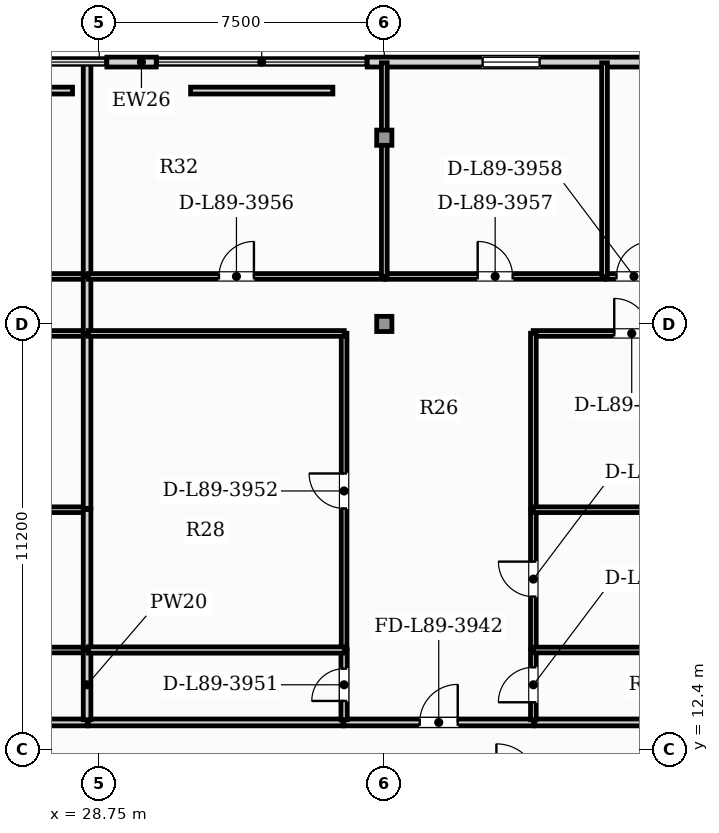
"""IFC4 building model, lengths in metres.
Left out: names, types, materials, properties, quantities, classifications, styles, units other than length and angle.
Written with IfcOpenShell. Run it as: python <this file> out.ifc"""

import sys

from ifc_helpers import new_model, si_unit, direction, frame, frame_2d, origin, origin_2d, place, context, subcontext, project, spatial, rectangle, hollow_rectangle, extrude, element, fill, save


model = new_model("IFC4")
c1 = context("Model", 3, precision=1e-05, world=origin(), true_north=direction((0.0, 1.0)))
c2 = subcontext(c1, "Body", "Model", "MODEL_VIEW")
j1 = project(units=[si_unit("LENGTHUNIT", "METRE"), si_unit("PLANEANGLEUNIT", "RADIAN")], contexts=[c1])
p1 = place(None, origin())
s1 = spatial("IfcSite", under=j1, at=p1, CompositionType="ELEMENT")
p2 = place(p1, origin())
s2 = spatial("IfcBuilding", under=s1, at=p2, CompositionType="ELEMENT")
p3 = place(p2, frame((0.0, 0.0, 362.25)))
s3 = spatial("IfcBuildingStorey", under=s2, at=p3, CompositionType="ELEMENT", Elevation=362.25)
for number, where, z_axis, x_axis in (
    (1, (36.25, 23.6, 0.0), (0.0, 0.0, 1.0), (1.0, 0.0, 0.0)),
    (2, (36.25, 28.5, 0.0), (0.0, 0.0, 1.0), (1.0, 0.0, 0.0)),
):
    element("IfcColumn", number, at=place(p3, frame(where, z_axis=z_axis, x_axis=x_axis)), inside=s3, PredefinedType="COLUMN", context=c2, shape_type="SweptSolid", body=[
        extrude(hollow_rectangle(XDim=0.4, YDim=0.4, WallThickness=0.02, at=origin_2d()), origin(), (0.0, 0.0, 1.0), 4.35),
    ])
p4 = place(p3, frame((30.25, 30.49, 0.0), z_axis=(0.0, 0.0, 1.0), x_axis=(-1.0, 0.0, 0.0)))
e3 = element("IfcWall", 3, at=p4, inside=s3, PredefinedType="SOLIDWALL", context=c2, shape_type="SweptSolid", body=[
    extrude(rectangle(XDim=1.3, YDim=0.26, at=frame_2d((0.65, 0.0))), origin(), (0.0, 0.0, 1.0), 4.1),
])
p5 = place(p3, frame((44.485, 30.49, 0.0), z_axis=(0.0, 0.0, 1.0), x_axis=(-1.0, 0.0, 0.0)))
e4 = element("IfcWall", 4, at=p5, inside=s3, PredefinedType="SOLIDWALL", context=c2, shape_type="SweptSolid", body=[
    extrude(rectangle(XDim=8.685, YDim=0.26, at=frame_2d((4.343, 0.0))), origin(), (0.0, 0.0, 1.0), 4.1),
])
p6 = place(p5, frame((4.148, 0.0, 0.9)))
e5 = element("IfcOpeningElement", 5, at=p6, cuts=e4, PredefinedType="OPENING", context=c2, shape_type="SweptSolid", body=[
    extrude(rectangle(XDim=1.5, YDim=1.95, at=frame_2d((0.75, 0.975))), frame((0.0, 0.14, 0.0), z_axis=(0.0, -1.0, 0.0), x_axis=(1.0, 0.0, 0.0)), (0.0, 0.0, 1.0), 0.28),
])
p7 = place(p3, frame((22.096, 13.115, 0.0), z_axis=(0.0, 0.0, 1.0), x_axis=(1.0, 0.0, 0.0)))
e6 = element("IfcWall", 6, at=p7, inside=s3, PredefinedType="PARTITIONING", context=c2, shape_type="SweptSolid", body=[
    extrude(rectangle(XDim=6.339, YDim=0.18, at=frame_2d((3.169, 0.0))), origin(), (0.0, 0.0, 1.0), 4.1),
])
p8 = place(p3, frame((35.187, 13.115, 0.0), z_axis=(0.0, 0.0, 1.0), x_axis=(1.0, 0.0, 0.0)))
e7 = element("IfcWall", 7, at=p8, inside=s3, PredefinedType="PARTITIONING", context=c2, shape_type="SweptSolid", body=[
    extrude(rectangle(XDim=4.99, YDim=0.18, at=frame_2d((2.495, 0.0))), origin(), (0.0, 0.0, 1.0), 4.1),
])
p9 = place(p8, frame((1.995, 0.0, 0.0)))
e8 = element("IfcOpeningElement", 8, at=p9, cuts=e7, PredefinedType="OPENING", context=c2, shape_type="SweptSolid", body=[
    extrude(rectangle(XDim=1.0, YDim=2.15, at=frame_2d((0.5, 1.075))), frame((0.0, 0.1, 0.0), z_axis=(0.0, -1.0, 0.0), x_axis=(1.0, 0.0, 0.0)), (0.0, 0.0, 1.0), 0.2),
])
p10 = place(p3, frame((28.464, 13.115, 0.0), z_axis=(0.0, 0.0, 1.0), x_axis=(1.0, 0.0, 0.0)))
e9 = element("IfcWall", 9, at=p10, inside=s3, PredefinedType="PARTITIONING", context=c2, shape_type="SweptSolid", body=[
    extrude(rectangle(XDim=6.693, YDim=0.18, at=frame_2d((3.346, 0.0))), origin(), (0.0, 0.0, 1.0), 4.1),
])
p11 = place(p3, frame((40.207, 13.115, 0.0), z_axis=(0.0, 0.0, 1.0), x_axis=(1.0, 0.0, 0.0)))
e10 = element("IfcWall", 10, at=p11, inside=s3, PredefinedType="PARTITIONING", context=c2, shape_type="SweptSolid", body=[
    extrude(rectangle(XDim=7.368, YDim=0.18, at=frame_2d((3.684, 0.0))), origin(), (0.0, 0.0, 1.0), 4.1),
])
p12 = place(p3, frame((22.056, 23.35, 0.0), z_axis=(0.0, 0.0, 1.0), x_axis=(1.0, 0.0, 0.0)))
e11 = element("IfcWall", 11, at=p12, inside=s3, PredefinedType="PARTITIONING", context=c2, shape_type="SweptSolid", body=[
    extrude(rectangle(XDim=6.379, YDim=0.15, at=frame_2d((3.189, 0.0))), origin(), (0.0, 0.0, 1.0), 3.2),
])
p13 = place(p12, frame((2.729, 0.0, 0.0)))
e12 = element("IfcOpeningElement", 12, at=p13, cuts=e11, PredefinedType="OPENING", context=c2, shape_type="SweptSolid", body=[
    extrude(rectangle(XDim=0.92, YDim=2.1, at=frame_2d((0.46, 1.05))), frame((0.0, 0.085, 0.0), z_axis=(0.0, -1.0, 0.0), x_axis=(1.0, 0.0, 0.0)), (0.0, 0.0, 1.0), 0.17),
])
p14 = place(p3, frame((23.231, 24.85, 0.0), z_axis=(0.0, 0.0, 1.0), x_axis=(1.0, 0.0, 0.0)))
e13 = element("IfcWall", 13, at=p14, inside=s3, PredefinedType="PARTITIONING", context=c2, shape_type="SweptSolid", body=[
    extrude(rectangle(XDim=5.203, YDim=0.15, at=frame_2d((2.602, 0.0))), origin(), (0.0, 0.0, 1.0), 4.1),
])
p15 = place(p14, frame((2.142, 0.0, 0.0)))
e14 = element("IfcOpeningElement", 14, at=p15, cuts=e13, PredefinedType="OPENING", context=c2, shape_type="SweptSolid", body=[
    extrude(rectangle(XDim=0.92, YDim=2.1, at=frame_2d((0.46, 1.05))), frame((0.0, 0.085, 0.0), z_axis=(0.0, -1.0, 0.0), x_axis=(1.0, 0.0, 0.0)), (0.0, 0.0, 1.0), 0.17),
])
p16 = place(p3, frame((28.429, 23.345, 0.0), z_axis=(0.0, 0.0, 1.0), x_axis=(0.0, 1.0, 0.0)))
e15 = element("IfcWall", 15, at=p16, inside=s3, PredefinedType="PARTITIONING", context=c2, shape_type="SweptSolid", body=[
    extrude(rectangle(XDim=1.51, YDim=0.2, at=frame_2d((0.755, 0.0))), origin(), (0.0, 0.0, 1.0), 4.1),
])
p17 = place(p3, frame((22.056, 15.02, 0.0), z_axis=(0.0, 0.0, 1.0), x_axis=(1.0, 0.0, 0.0)))
e16 = element("IfcWall", 16, at=p17, inside=s3, PredefinedType="PARTITIONING", context=c2, shape_type="SweptSolid", body=[
    extrude(rectangle(XDim=6.379, YDim=0.15, at=frame_2d((3.189, 0.0))), origin(), (0.0, 0.0, 1.0), 4.1),
])
p18 = place(p3, frame((28.429, 13.185, 0.0), z_axis=(0.0, 0.0, 1.0), x_axis=(0.0, 1.0, 0.0)))
e17 = element("IfcWall", 17, at=p18, inside=s3, PredefinedType="PARTITIONING", context=c2, shape_type="SweptSolid", body=[
    extrude(rectangle(XDim=1.84, YDim=0.2, at=frame_2d((0.92, 0.0))), origin(), (0.0, 0.0, 1.0), 4.1),
])
p19 = place(p3, frame((22.056, 18.712, 0.0), z_axis=(0.0, 0.0, 1.0), x_axis=(1.0, 0.0, 0.0)))
e18 = element("IfcWall", 18, at=p19, inside=s3, PredefinedType="PARTITIONING", context=c2, shape_type="SweptSolid", body=[
    extrude(rectangle(XDim=6.379, YDim=0.15, at=frame_2d((3.189, 0.0))), origin(), (0.0, 0.0, 1.0), 4.1),
])
p20 = place(p3, frame((28.429, 15.055, 0.0), z_axis=(0.0, 0.0, 1.0), x_axis=(0.0, 1.0, 0.0)))
e19 = element("IfcWall", 19, at=p20, inside=s3, PredefinedType="PARTITIONING", context=c2, shape_type="SweptSolid", body=[
    extrude(rectangle(XDim=3.662, YDim=0.2, at=frame_2d((1.831, 0.0))), origin(), (0.0, 0.0, 1.0), 4.1),
])
p21 = place(p3, frame((28.429, 18.747, 0.0), z_axis=(0.0, 0.0, 1.0), x_axis=(0.0, 1.0, 0.0)))
e20 = element("IfcWall", 20, at=p21, inside=s3, PredefinedType="PARTITIONING", context=c2, shape_type="SweptSolid", body=[
    extrude(rectangle(XDim=4.568, YDim=0.2, at=frame_2d((2.284, 0.0))), origin(), (0.0, 0.0, 1.0), 4.1),
])
p22 = place(p3, frame((28.429, 24.885, 0.0), z_axis=(0.0, 0.0, 1.0), x_axis=(0.0, 1.0, 0.0)))
e21 = element("IfcWall", 21, at=p22, inside=s3, PredefinedType="PARTITIONING", context=c2, shape_type="SweptSolid", body=[
    extrude(rectangle(XDim=5.587, YDim=0.2, at=frame_2d((2.793, 0.0))), origin(), (0.0, 0.0, 1.0), 4.1),
])
p23 = place(p3, frame((35.192, 13.185, 0.0), z_axis=(0.0, 0.0, 1.0), x_axis=(0.0, 1.0, 0.0)))
e22 = element("IfcWall", 22, at=p23, inside=s3, PredefinedType="PLUMBINGWALL", context=c2, shape_type="SweptSolid", body=[
    extrude(rectangle(XDim=1.84, YDim=0.165, at=frame_2d((0.92, 0.0))), origin(), (0.0, 0.0, 1.0), 4.1),
])
p24 = place(p23, frame((0.495, 0.0, 0.0)))
e23 = element("IfcOpeningElement", 23, at=p24, cuts=e22, PredefinedType="OPENING", context=c2, shape_type="SweptSolid", body=[
    extrude(rectangle(XDim=0.85, YDim=2.1, at=frame_2d((0.425, 1.05))), frame((0.0, 0.093, 0.0), z_axis=(0.0, -1.0, 0.0), x_axis=(1.0, 0.0, 0.0)), (0.0, 0.0, 1.0), 0.185),
])
p25 = place(p3, frame((35.192, 15.055, 0.0), z_axis=(0.0, 0.0, 1.0), x_axis=(0.0, 1.0, 0.0)))
e24 = element("IfcWall", 24, at=p25, inside=s3, PredefinedType="PARTITIONING", context=c2, shape_type="SweptSolid", body=[
    extrude(rectangle(XDim=8.3, YDim=0.15, at=frame_2d((4.15, 0.0))), origin(), (0.0, 0.0, 1.0), 4.1),
])
p26 = place(p25, frame((3.69, 0.0, 0.0)))
e25 = element("IfcOpeningElement", 25, at=p26, cuts=e24, PredefinedType="OPENING", context=c2, shape_type="SweptSolid", body=[
    extrude(rectangle(XDim=0.92, YDim=2.1, at=frame_2d((0.46, 1.05))), frame((0.0, 0.085, 0.0), z_axis=(0.0, -1.0, 0.0), x_axis=(1.0, 0.0, 0.0)), (0.0, 0.0, 1.0), 0.17),
])
p27 = place(p3, frame((28.464, 23.35, 0.0), z_axis=(0.0, 0.0, 1.0), x_axis=(1.0, 0.0, 0.0)))
e26 = element("IfcWall", 26, at=p27, inside=s3, PredefinedType="PARTITIONING", context=c2, shape_type="SweptSolid", body=[
    extrude(rectangle(XDim=6.733, YDim=0.15, at=frame_2d((3.366, 0.0))), origin(), (0.0, 0.0, 1.0), 3.2),
])
p28 = place(p3, frame((40.172, 13.185, 0.0), z_axis=(0.0, 0.0, 1.0), x_axis=(0.0, 1.0, 0.0)))
e27 = element("IfcWall", 27, at=p28, inside=s3, PredefinedType="PARTITIONING", context=c2, shape_type="SweptSolid", body=[
    extrude(rectangle(XDim=1.84, YDim=0.15, at=frame_2d((0.92, 0.0))), origin(), (0.0, 0.0, 1.0), 3.797),
])
p29 = place(p28, frame((0.46, 0.0, 0.0)))
e28 = element("IfcOpeningElement", 28, at=p29, cuts=e27, PredefinedType="OPENING", context=c2, shape_type="SweptSolid", body=[
    extrude(rectangle(XDim=0.92, YDim=2.1, at=frame_2d((0.46, 1.05))), frame((0.0, 0.085, 0.0), z_axis=(0.0, -1.0, 0.0), x_axis=(1.0, 0.0, 0.0)), (0.0, 0.0, 1.0), 0.17),
])
p30 = place(p3, frame((40.172, 15.055, 0.0), z_axis=(0.0, 0.0, 1.0), x_axis=(0.0, 1.0, 0.0)))
e29 = element("IfcWall", 29, at=p30, inside=s3, PredefinedType="PARTITIONING", context=c2, shape_type="SweptSolid", body=[
    extrude(rectangle(XDim=3.662, YDim=0.15, at=frame_2d((1.831, 0.0))), origin(), (0.0, 0.0, 1.0), 3.797),
])
p31 = place(p30, frame((1.371, 0.0, 0.0)))
e30 = element("IfcOpeningElement", 30, at=p31, cuts=e29, PredefinedType="OPENING", context=c2, shape_type="SweptSolid", body=[
    extrude(rectangle(XDim=0.92, YDim=2.1, at=frame_2d((0.46, 1.05))), frame((0.0, 0.085, 0.0), z_axis=(0.0, -1.0, 0.0), x_axis=(1.0, 0.0, 0.0)), (0.0, 0.0, 1.0), 0.17),
])
p32 = place(p3, frame((40.167, 23.35, 0.0), z_axis=(0.0, 0.0, 1.0), x_axis=(1.0, 0.0, 0.0)))
e31 = element("IfcWall", 31, at=p32, inside=s3, PredefinedType="PARTITIONING", context=c2, shape_type="SweptSolid", body=[
    extrude(rectangle(XDim=7.408, YDim=0.15, at=frame_2d((3.704, 0.0))), origin(), (0.0, 0.0, 1.0), 4.1),
])
p33 = place(p32, frame((2.133, 0.0, 0.0)))
e32 = element("IfcOpeningElement", 32, at=p33, cuts=e31, PredefinedType="OPENING", context=c2, shape_type="SweptSolid", body=[
    extrude(rectangle(XDim=0.92, YDim=2.1, at=frame_2d((0.46, 1.05))), frame((0.0, 0.085, 0.0), z_axis=(0.0, -1.0, 0.0), x_axis=(1.0, 0.0, 0.0)), (0.0, 0.0, 1.0), 0.17),
])
p34 = place(p3, frame((40.172, 18.747, 0.0), z_axis=(0.0, 0.0, 1.0), x_axis=(0.0, 1.0, 0.0)))
e33 = element("IfcWall", 33, at=p34, inside=s3, PredefinedType="PARTITIONING", context=c2, shape_type="SweptSolid", body=[
    extrude(rectangle(XDim=4.608, YDim=0.15, at=frame_2d((2.304, 0.0))), origin(), (0.0, 0.0, 1.0), 3.797),
])
p35 = place(p3, frame((28.464, 24.85, 0.0), z_axis=(0.0, 0.0, 1.0), x_axis=(1.0, 0.0, 0.0)))
e34 = element("IfcWall", 34, at=p35, inside=s3, PredefinedType="PARTITIONING", context=c2, shape_type="SweptSolid", body=[
    extrude(rectangle(XDim=7.791, YDim=0.15, at=frame_2d((3.895, 0.0))), origin(), (0.0, 0.0, 1.0), 4.1),
])
p36 = place(p35, frame((3.435, 0.0, 0.0)))
e35 = element("IfcOpeningElement", 35, at=p36, cuts=e34, PredefinedType="OPENING", context=c2, shape_type="SweptSolid", body=[
    extrude(rectangle(XDim=0.92, YDim=2.1, at=frame_2d((0.46, 1.05))), frame((0.0, 0.085, 0.0), z_axis=(0.0, -1.0, 0.0), x_axis=(1.0, 0.0, 0.0)), (0.0, 0.0, 1.0), 0.17),
])
p37 = place(p3, frame((36.285, 24.85, 0.0), z_axis=(0.0, 0.0, 1.0), x_axis=(1.0, 0.0, 0.0)))
e36 = element("IfcWall", 36, at=p37, inside=s3, PredefinedType="PARTITIONING", context=c2, shape_type="SweptSolid", body=[
    extrude(rectangle(XDim=5.764, YDim=0.15, at=frame_2d((2.882, 0.0))), origin(), (0.0, 0.0, 1.0), 4.1),
])
p38 = place(p37, frame((2.422, 0.0, 0.0)))
e37 = element("IfcOpeningElement", 37, at=p38, cuts=e36, PredefinedType="OPENING", context=c2, shape_type="SweptSolid", body=[
    extrude(rectangle(XDim=0.92, YDim=2.1, at=frame_2d((0.46, 1.05))), frame((0.0, 0.085, 0.0), z_axis=(0.0, -1.0, 0.0), x_axis=(1.0, 0.0, 0.0)), (0.0, 0.0, 1.0), 0.17),
])
p39 = place(p3, frame((42.079, 24.85, 0.0), z_axis=(0.0, 0.0, 1.0), x_axis=(1.0, 0.0, 0.0)))
e38 = element("IfcWall", 38, at=p39, inside=s3, PredefinedType="PARTITIONING", context=c2, shape_type="SweptSolid", body=[
    extrude(rectangle(XDim=5.496, YDim=0.15, at=frame_2d((2.748, 0.0))), origin(), (0.0, 0.0, 1.0), 4.1),
])
p40 = place(p39, frame((0.28, 0.0, 0.0)))
e39 = element("IfcOpeningElement", 39, at=p40, cuts=e38, PredefinedType="OPENING", context=c2, shape_type="SweptSolid", body=[
    extrude(rectangle(XDim=0.92, YDim=2.1, at=frame_2d((0.46, 1.05))), frame((0.0, 0.085, 0.0), z_axis=(0.0, -1.0, 0.0), x_axis=(1.0, 0.0, 0.0)), (0.0, 0.0, 1.0), 0.17),
])
p41 = place(p3, frame((28.464, 15.02, 0.0), z_axis=(0.0, 0.0, 1.0), x_axis=(1.0, 0.0, 0.0)))
e40 = element("IfcWall", 40, at=p41, inside=s3, PredefinedType="PLUMBINGWALL", context=c2, shape_type="SweptSolid", body=[
    extrude(rectangle(XDim=6.733, YDim=0.165, at=frame_2d((3.366, 0.0))), origin(), (0.0, 0.0, 1.0), 4.1),
])
for number, where, z_axis, x_axis in (
    (41, (40.167, 15.02, 0.0), (0.0, 0.0, 1.0), (1.0, 0.0, 0.0)),
    (42, (40.167, 18.712, 0.0), (0.0, 0.0, 1.0), (1.0, 0.0, 0.0)),
):
    element("IfcWall", number, at=place(p3, frame(where, z_axis=z_axis, x_axis=x_axis)), inside=s3, PredefinedType="PARTITIONING", context=c2, shape_type="SweptSolid", body=[
        extrude(rectangle(XDim=7.408, YDim=0.15, at=frame_2d((3.704, 0.0))), origin(), (0.0, 0.0, 1.0), 4.1),
    ])
p42 = place(p3, frame((36.25, 24.845, 0.0), z_axis=(0.0, 0.0, 1.0), x_axis=(0.0, 1.0, 0.0)))
e43 = element("IfcWall", 43, at=p42, inside=s3, PredefinedType="PARTITIONING", context=c2, shape_type="SweptSolid", body=[
    extrude(rectangle(XDim=5.625, YDim=0.15, at=frame_2d((2.813, 0.0))), origin(), (0.0, 0.0, 1.0), 3.797),
])
p43 = place(p3, frame((42.044, 24.845, 0.0), z_axis=(0.0, 0.0, 1.0), x_axis=(0.0, 1.0, 0.0)))
e44 = element("IfcWall", 44, at=p43, inside=s3, PredefinedType="PARTITIONING", context=c2, shape_type="SweptSolid", body=[
    extrude(rectangle(XDim=5.625, YDim=0.15, at=frame_2d((2.813, 0.0))), origin(), (0.0, 0.0, 1.0), 4.1),
])
for number, where, z_axis, x_axis in (
    (45, (24.303, 29.74, 0.0), (0.0, 0.0, 1.0), (1.0, 0.0, 0.0)),
    (46, (31.153, 29.74, 0.0), (0.0, 0.0, 1.0), (1.0, 0.0, 0.0)),
):
    element("IfcWall", number, at=place(p3, frame(where, z_axis=z_axis, x_axis=x_axis)), inside=s3, PredefinedType="PARTITIONING", context=c2, shape_type="SweptSolid", body=[
        extrude(rectangle(XDim=3.744, YDim=0.18, at=frame_2d((1.872, 0.0))), origin(), (0.0, 0.0, 1.0), 4.1),
    ])
p44 = place(p6, origin())
e47 = element("IfcWindow", 47, at=p44, inside=s3, PartitioningType="SINGLE_PANEL", PredefinedType="WINDOW", context=c2, shape_type="SweptSolid", body=[
    extrude(rectangle(XDim=1.5, YDim=1.95, at=frame_2d((0.75, 0.975))), frame((0.0, 0.03, 0.0), z_axis=(0.0, -1.0, 0.0), x_axis=(1.0, 0.0, 0.0)), (0.0, 0.0, 1.0), 0.06),
])
fill(e5, e47)
p45 = place(p9, origin())
e48 = element("IfcDoor", 48, at=p45, inside=s3, OperationType="SINGLE_SWING_RIGHT", PredefinedType="DOOR", context=c2, shape_type="SweptSolid", body=[
    extrude(rectangle(XDim=1.0, YDim=2.15, at=frame_2d((0.5, 1.075))), frame((0.0, 0.025, 0.0), z_axis=(0.0, -1.0, 0.0), x_axis=(1.0, 0.0, 0.0)), (0.0, 0.0, 1.0), 0.05),
])
fill(e8, e48)
p46 = place(p24, origin())
e49 = element("IfcDoor", 49, at=p46, inside=s3, OperationType="SINGLE_SWING_LEFT", PredefinedType="DOOR", context=c2, shape_type="SweptSolid", body=[
    extrude(rectangle(XDim=0.85, YDim=2.1, at=frame_2d((0.425, 1.05))), frame((0.0, 0.025, 0.0), z_axis=(0.0, -1.0, 0.0), x_axis=(1.0, 0.0, 0.0)), (0.0, 0.0, 1.0), 0.05),
])
fill(e23, e49)
p47 = place(p26, origin())
e50 = element("IfcDoor", 50, at=p47, inside=s3, OperationType="SINGLE_SWING_RIGHT", PredefinedType="DOOR", context=c2, shape_type="SweptSolid", body=[
    extrude(rectangle(XDim=0.92, YDim=2.1, at=frame_2d((0.46, 1.05))), frame((0.0, 0.025, 0.0), z_axis=(0.0, -1.0, 0.0), x_axis=(1.0, 0.0, 0.0)), (0.0, 0.0, 1.0), 0.05),
])
fill(e25, e50)
p48 = place(p29, origin())
e51 = element("IfcDoor", 51, at=p48, inside=s3, OperationType="SINGLE_SWING_LEFT", PredefinedType="DOOR", context=c2, shape_type="SweptSolid", body=[
    extrude(rectangle(XDim=0.92, YDim=2.1, at=frame_2d((0.46, 1.05))), frame((0.0, 0.025, 0.0), z_axis=(0.0, -1.0, 0.0), x_axis=(1.0, 0.0, 0.0)), (0.0, 0.0, 1.0), 0.05),
])
fill(e28, e51)
p49 = place(p31, origin())
e52 = element("IfcDoor", 52, at=p49, inside=s3, OperationType="SINGLE_SWING_RIGHT", PredefinedType="DOOR", context=c2, shape_type="SweptSolid", body=[
    extrude(rectangle(XDim=0.92, YDim=2.1, at=frame_2d((0.46, 1.05))), frame((0.0, 0.025, 0.0), z_axis=(0.0, -1.0, 0.0), x_axis=(1.0, 0.0, 0.0)), (0.0, 0.0, 1.0), 0.05),
])
fill(e30, e52)
p50 = place(p33, origin())
e53 = element("IfcDoor", 53, at=p50, inside=s3, OperationType="SINGLE_SWING_LEFT", PredefinedType="DOOR", context=c2, shape_type="SweptSolid", body=[
    extrude(rectangle(XDim=0.92, YDim=2.1, at=frame_2d((0.46, 1.05))), frame((0.0, 0.025, 0.0), z_axis=(0.0, -1.0, 0.0), x_axis=(1.0, 0.0, 0.0)), (0.0, 0.0, 1.0), 0.05),
])
fill(e32, e53)
p51 = place(p36, origin())
e54 = element("IfcDoor", 54, at=p51, inside=s3, OperationType="SINGLE_SWING_RIGHT", PredefinedType="DOOR", context=c2, shape_type="SweptSolid", body=[
    extrude(rectangle(XDim=0.92, YDim=2.1, at=frame_2d((0.46, 1.05))), frame((0.0, 0.025, 0.0), z_axis=(0.0, -1.0, 0.0), x_axis=(1.0, 0.0, 0.0)), (0.0, 0.0, 1.0), 0.05),
])
fill(e35, e54)
p52 = place(p38, origin())
e55 = element("IfcDoor", 55, at=p52, inside=s3, OperationType="SINGLE_SWING_LEFT", PredefinedType="DOOR", context=c2, shape_type="SweptSolid", body=[
    extrude(rectangle(XDim=0.92, YDim=2.1, at=frame_2d((0.46, 1.05))), frame((0.0, 0.025, 0.0), z_axis=(0.0, -1.0, 0.0), x_axis=(1.0, 0.0, 0.0)), (0.0, 0.0, 1.0), 0.05),
])
fill(e37, e55)
p53 = place(p40, origin())
e56 = element("IfcDoor", 56, at=p53, inside=s3, OperationType="SINGLE_SWING_RIGHT", PredefinedType="DOOR", context=c2, shape_type="SweptSolid", body=[
    extrude(rectangle(XDim=0.92, YDim=2.1, at=frame_2d((0.46, 1.05))), frame((0.0, 0.025, 0.0), z_axis=(0.0, -1.0, 0.0), x_axis=(1.0, 0.0, 0.0)), (0.0, 0.0, 1.0), 0.05),
])
fill(e39, e56)
save(model, sys.argv[1])
